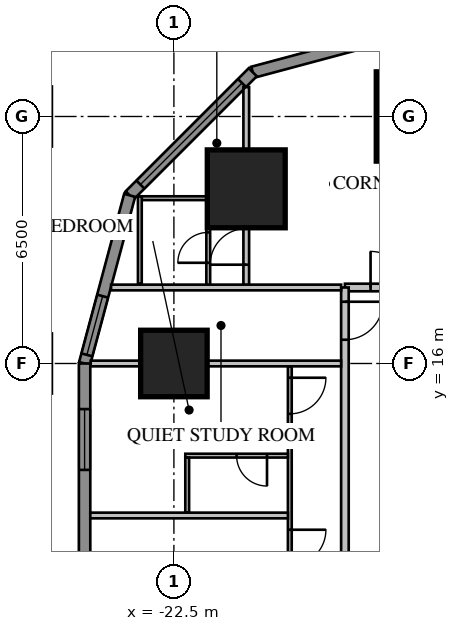
"""IFC4 building model, lengths in metres.
Left out: names, types, materials, properties, quantities, classifications, styles, units other than length and angle.
Written with IfcOpenShell. Run it as: python <this file> out.ifc"""

import sys

from ifc_helpers import new_model, si_unit, direction, frame, frame_2d, origin, origin_2d, place, context, subcontext, project, spatial, rectangle, extrude, element, fill, save


model = new_model("IFC4")
c1 = context("Model", 3, precision=1e-05, world=origin(), true_north=direction((0.0, 1.0)))
c2 = subcontext(c1, "Body", "Model", "MODEL_VIEW")
j1 = project(units=[si_unit("LENGTHUNIT", "METRE"), si_unit("PLANEANGLEUNIT", "RADIAN")], contexts=[c1])
p1 = place(None, origin())
s1 = spatial("IfcSite", under=j1, at=p1, CompositionType="ELEMENT")
p2 = place(p1, origin())
s2 = spatial("IfcBuilding", under=s1, at=p2, CompositionType="ELEMENT")
p3 = place(p2, frame((0.0, 0.0, 23.7)))
s3 = spatial("IfcBuildingStorey", under=s2, at=p3, CompositionType="ELEMENT", Elevation=23.7)
p4 = place(p3, frame((-16.0, 22.5, 0.0), z_axis=(0.0, 0.0, 1.0), x_axis=(1.0, 0.0, 0.0)))
e1 = element("IfcColumn", 1, at=p4, inside=s3, PredefinedType="COLUMN", context=c2, shape_type="SweptSolid", body=[
    extrude(rectangle(XDim=2.35, YDim=2.35, at=origin_2d()), origin(), (0.0, 0.0, 1.0), 3.85),
])
p5 = place(p3, frame((-20.596, 20.596, 0.0), z_axis=(0.0, 0.0, 1.0), x_axis=(1.0, 0.0, 0.0)))
e2 = element("IfcColumn", 2, at=p5, inside=s3, PredefinedType="COLUMN", context=c2, shape_type="SweptSolid", body=[
    extrude(rectangle(XDim=2.05, YDim=2.05, at=origin_2d()), origin(), (0.0, 0.0, 1.0), 3.85),
])
p6 = place(p3, frame((-22.5, 16.0, 0.0), z_axis=(0.0, 0.0, 1.0), x_axis=(1.0, 0.0, 0.0)))
e3 = element("IfcColumn", 3, at=p6, inside=s3, PredefinedType="COLUMN", context=c2, shape_type="SweptSolid", body=[
    extrude(rectangle(XDim=1.75, YDim=1.75, at=origin_2d()), origin(), (0.0, 0.0, 1.0), 3.85),
])
p7 = place(p3, frame((-16.0, 24.85, 0.0), z_axis=(0.0, 0.0, 1.0), x_axis=(-0.965920218567, -0.258839972501, 0.0)))
e4 = element("IfcWall", 4, at=p7, inside=s3, PredefinedType="SOLIDWALL", context=c2, shape_type="SweptSolid", body=[
    extrude(rectangle(XDim=4.581, YDim=0.3, at=frame_2d((2.291, 0.0))), origin(), (0.0, 0.0, 1.0), 3.65),
])
p8 = place(p3, frame((-20.425, 23.664, 0.0), z_axis=(0.0, 0.0, 1.0), x_axis=(-0.707106781187, -0.707106781187, 0.0)))
e5 = element("IfcWall", 5, at=p8, inside=s3, PredefinedType="SOLIDWALL", context=c2, shape_type="SweptSolid", body=[
    extrude(rectangle(XDim=4.581, YDim=0.3, at=frame_2d((2.291, 0.0))), origin(), (0.0, 0.0, 1.0), 3.65),
])
p9 = place(p8, frame((0.4, 0.0, 0.75)))
e6 = element("IfcOpeningElement", 6, at=p9, cuts=e5, PredefinedType="OPENING", context=c2, shape_type="SweptSolid", body=[
    extrude(rectangle(XDim=3.781, YDim=1.8, at=frame_2d((1.891, 0.9))), frame((0.0, 0.17, 0.0), z_axis=(0.0, -1.0, 0.0), x_axis=(1.0, 0.0, 0.0)), (0.0, 0.0, 1.0), 0.34),
])
p10 = place(p3, frame((-23.664, 20.425, 0.0), z_axis=(0.0, 0.0, 1.0), x_axis=(-0.258839972501, -0.965920218567, 0.0)))
e7 = element("IfcWall", 7, at=p10, inside=s3, PredefinedType="SOLIDWALL", context=c2, shape_type="SweptSolid", body=[
    extrude(rectangle(XDim=4.581, YDim=0.3, at=frame_2d((2.291, 0.0))), origin(), (0.0, 0.0, 1.0), 3.65),
])
p11 = place(p10, frame((2.746, 0.0, 0.75)))
e8 = element("IfcOpeningElement", 8, at=p11, cuts=e7, PredefinedType="OPENING", context=c2, shape_type="SweptSolid", body=[
    extrude(rectangle(XDim=1.6, YDim=1.8, at=frame_2d((0.8, 0.9))), frame((0.0, 0.17, 0.0), z_axis=(0.0, -1.0, 0.0), x_axis=(1.0, 0.0, 0.0)), (0.0, 0.0, 1.0), 0.34),
])
p12 = place(p3, frame((-24.85, 16.0, 0.0), z_axis=(0.0, 0.0, 1.0), x_axis=(0.0, -1.0, 0.0)))
e9 = element("IfcWall", 9, at=p12, inside=s3, PredefinedType="SOLIDWALL", context=c2, shape_type="SweptSolid", body=[
    extrude(rectangle(XDim=32.0, YDim=0.3, at=frame_2d((16.0, 0.0))), origin(), (0.0, 0.0, 1.0), 3.65),
])
p13 = place(p12, frame((1.2, 0.0, 0.75)))
e10 = element("IfcOpeningElement", 10, at=p13, cuts=e9, PredefinedType="OPENING", context=c2, shape_type="SweptSolid", body=[
    extrude(rectangle(XDim=1.6, YDim=1.8, at=frame_2d((0.8, 0.9))), frame((0.0, 0.17, 0.0), z_axis=(0.0, -1.0, 0.0), x_axis=(1.0, 0.0, 0.0)), (0.0, 0.0, 1.0), 0.34),
])
p14 = place(p12, frame((5.2, 0.0, 0.75)))
e11 = element("IfcOpeningElement", 11, at=p14, cuts=e9, PredefinedType="OPENING", context=c2, shape_type="SweptSolid", body=[
    extrude(rectangle(XDim=1.6, YDim=1.8, at=frame_2d((0.8, 0.9))), frame((0.0, 0.17, 0.0), z_axis=(0.0, -1.0, 0.0), x_axis=(1.0, 0.0, 0.0)), (0.0, 0.0, 1.0), 0.34),
])
p15 = place(p12, frame((17.2, 0.0, 0.75)))
e12 = element("IfcOpeningElement", 12, at=p15, cuts=e9, PredefinedType="OPENING", context=c2, shape_type="SweptSolid", body=[
    extrude(rectangle(XDim=1.6, YDim=1.8, at=frame_2d((0.8, 0.9))), frame((0.0, 0.17, 0.0), z_axis=(0.0, -1.0, 0.0), x_axis=(1.0, 0.0, 0.0)), (0.0, 0.0, 1.0), 0.34),
])
p16 = place(p12, frame((21.2, 0.0, 0.75)))
e13 = element("IfcOpeningElement", 13, at=p16, cuts=e9, PredefinedType="OPENING", context=c2, shape_type="SweptSolid", body=[
    extrude(rectangle(XDim=1.6, YDim=1.8, at=frame_2d((0.8, 0.9))), frame((0.0, 0.17, 0.0), z_axis=(0.0, -1.0, 0.0), x_axis=(1.0, 0.0, 0.0)), (0.0, 0.0, 1.0), 0.34),
])
p17 = place(p12, frame((25.2, 0.0, 0.75)))
e14 = element("IfcOpeningElement", 14, at=p17, cuts=e9, PredefinedType="OPENING", context=c2, shape_type="SweptSolid", body=[
    extrude(rectangle(XDim=1.6, YDim=1.8, at=frame_2d((0.8, 0.9))), frame((0.0, 0.17, 0.0), z_axis=(0.0, -1.0, 0.0), x_axis=(1.0, 0.0, 0.0)), (0.0, 0.0, 1.0), 0.34),
])
p18 = place(p12, frame((29.2, 0.0, 0.75)))
e15 = element("IfcOpeningElement", 15, at=p18, cuts=e9, PredefinedType="OPENING", context=c2, shape_type="SweptSolid", body=[
    extrude(rectangle(XDim=1.6, YDim=1.8, at=frame_2d((0.8, 0.9))), frame((0.0, 0.17, 0.0), z_axis=(0.0, -1.0, 0.0), x_axis=(1.0, 0.0, 0.0)), (0.0, 0.0, 1.0), 0.34),
])
p19 = place(p12, frame((8.8, 0.0, 0.75)))
e16 = element("IfcOpeningElement", 16, at=p19, cuts=e9, PredefinedType="OPENING", context=c2, shape_type="SweptSolid", body=[
    extrude(rectangle(XDim=2.4, YDim=1.8, at=frame_2d((1.2, 0.9))), frame((0.0, 0.17, 0.0), z_axis=(0.0, -1.0, 0.0), x_axis=(1.0, 0.0, 0.0)), (0.0, 0.0, 1.0), 0.34),
])
p20 = place(p12, frame((13.812, 0.0, 0.0)))
e17 = element("IfcOpeningElement", 17, at=p20, cuts=e9, PredefinedType="OPENING", context=c2, shape_type="SweptSolid", body=[
    extrude(rectangle(XDim=1.0, YDim=2.4, at=frame_2d((0.5, 1.2))), frame((0.0, 0.17, 0.0), z_axis=(0.0, -1.0, 0.0), x_axis=(1.0, 0.0, 0.0)), (0.0, 0.0, 1.0), 0.34),
])
p21 = place(p3, frame((18.0, 18.0, 0.0), z_axis=(0.0, 0.0, 1.0), x_axis=(-1.0, 0.0, 0.0)))
e18 = element("IfcWall", 18, at=p21, inside=s3, PredefinedType="PARTITIONING", context=c2, shape_type="SweptSolid", body=[
    extrude(rectangle(XDim=36.0, YDim=0.2, at=frame_2d((18.0, 0.0))), origin(), (0.0, 0.0, 1.0), 3.65),
])
p22 = place(p21, frame((0.375, 0.0, 0.0)))
e19 = element("IfcOpeningElement", 19, at=p22, cuts=e18, PredefinedType="OPENING", context=c2, shape_type="SweptSolid", body=[
    extrude(rectangle(XDim=1.0, YDim=2.1, at=frame_2d((0.5, 1.05))), frame((0.0, 0.12, 0.0), z_axis=(0.0, -1.0, 0.0), x_axis=(1.0, 0.0, 0.0)), (0.0, 0.0, 1.0), 0.24),
])
p23 = place(p21, frame((3.8, 0.0, 0.0)))
e20 = element("IfcOpeningElement", 20, at=p23, cuts=e18, PredefinedType="OPENING", context=c2, shape_type="SweptSolid", body=[
    extrude(rectangle(XDim=0.95, YDim=2.1, at=frame_2d((0.475, 1.05))), frame((0.0, 0.12, 0.0), z_axis=(0.0, -1.0, 0.0), x_axis=(1.0, 0.0, 0.0)), (0.0, 0.0, 1.0), 0.24),
])
p24 = place(p21, frame((7.8, 0.0, 0.0)))
e21 = element("IfcOpeningElement", 21, at=p24, cuts=e18, PredefinedType="OPENING", context=c2, shape_type="SweptSolid", body=[
    extrude(rectangle(XDim=0.95, YDim=2.1, at=frame_2d((0.475, 1.05))), frame((0.0, 0.12, 0.0), z_axis=(0.0, -1.0, 0.0), x_axis=(1.0, 0.0, 0.0)), (0.0, 0.0, 1.0), 0.24),
])
p25 = place(p21, frame((19.8, 0.0, 0.0)))
e22 = element("IfcOpeningElement", 22, at=p25, cuts=e18, PredefinedType="OPENING", context=c2, shape_type="SweptSolid", body=[
    extrude(rectangle(XDim=0.95, YDim=2.1, at=frame_2d((0.475, 1.05))), frame((0.0, 0.12, 0.0), z_axis=(0.0, -1.0, 0.0), x_axis=(1.0, 0.0, 0.0)), (0.0, 0.0, 1.0), 0.24),
])
p26 = place(p21, frame((23.8, 0.0, 0.0)))
e23 = element("IfcOpeningElement", 23, at=p26, cuts=e18, PredefinedType="OPENING", context=c2, shape_type="SweptSolid", body=[
    extrude(rectangle(XDim=0.95, YDim=2.1, at=frame_2d((0.475, 1.05))), frame((0.0, 0.12, 0.0), z_axis=(0.0, -1.0, 0.0), x_axis=(1.0, 0.0, 0.0)), (0.0, 0.0, 1.0), 0.24),
])
p27 = place(p21, frame((27.8, 0.0, 0.0)))
e24 = element("IfcOpeningElement", 24, at=p27, cuts=e18, PredefinedType="OPENING", context=c2, shape_type="SweptSolid", body=[
    extrude(rectangle(XDim=0.95, YDim=2.1, at=frame_2d((0.475, 1.05))), frame((0.0, 0.12, 0.0), z_axis=(0.0, -1.0, 0.0), x_axis=(1.0, 0.0, 0.0)), (0.0, 0.0, 1.0), 0.24),
])
p28 = place(p21, frame((31.8, 0.0, 0.0)))
e25 = element("IfcOpeningElement", 25, at=p28, cuts=e18, PredefinedType="OPENING", context=c2, shape_type="SweptSolid", body=[
    extrude(rectangle(XDim=0.95, YDim=2.1, at=frame_2d((0.475, 1.05))), frame((0.0, 0.12, 0.0), z_axis=(0.0, -1.0, 0.0), x_axis=(1.0, 0.0, 0.0)), (0.0, 0.0, 1.0), 0.24),
])
p29 = place(p21, frame((34.375, 0.0, 0.0)))
e26 = element("IfcOpeningElement", 26, at=p29, cuts=e18, PredefinedType="OPENING", context=c2, shape_type="SweptSolid", body=[
    extrude(rectangle(XDim=0.95, YDim=2.1, at=frame_2d((0.475, 1.05))), frame((0.0, 0.12, 0.0), z_axis=(0.0, -1.0, 0.0), x_axis=(1.0, 0.0, 0.0)), (0.0, 0.0, 1.0), 0.24),
])
p30 = place(p21, frame((11.2, 0.0, 0.0)))
e27 = element("IfcOpeningElement", 27, at=p30, cuts=e18, PredefinedType="OPENING", context=c2, shape_type="SweptSolid", body=[
    extrude(rectangle(XDim=1.0, YDim=2.1, at=frame_2d((0.5, 1.05))), frame((0.0, 0.12, 0.0), z_axis=(0.0, -1.0, 0.0), x_axis=(1.0, 0.0, 0.0)), (0.0, 0.0, 1.0), 0.24),
])
p31 = place(p3, frame((-21.596, 18.065, 0.0), z_axis=(0.0, 0.0, 1.0), x_axis=(0.0, 1.0, 0.0)))
e28 = element("IfcWall", 28, at=p31, inside=s3, PredefinedType="PARTITIONING", context=c2, shape_type="SweptSolid", body=[
    extrude(rectangle(XDim=2.335, YDim=0.1, at=frame_2d((1.167, 0.0))), origin(), (0.0, 0.0, 1.0), 3.65),
])
p32 = place(p31, frame((0.585, 0.0, 0.0)))
e29 = element("IfcOpeningElement", 29, at=p32, cuts=e28, PredefinedType="OPENING", context=c2, shape_type="SweptSolid", body=[
    extrude(rectangle(XDim=0.8, YDim=2.1, at=frame_2d((0.4, 1.05))), frame((0.0, 0.07, 0.0), z_axis=(0.0, -1.0, 0.0), x_axis=(1.0, 0.0, 0.0)), (0.0, 0.0, 1.0), 0.14),
])
p33 = place(p3, frame((-21.646, 20.35, 0.0), z_axis=(0.0, 0.0, 1.0), x_axis=(-1.0, 0.0, 0.0)))
e30 = element("IfcWall", 30, at=p33, inside=s3, PredefinedType="PARTITIONING", context=c2, shape_type="SweptSolid", body=[
    extrude(rectangle(XDim=1.7, YDim=0.1, at=frame_2d((0.85, 0.0))), origin(), (0.0, 0.0, 1.0), 3.65),
])
p34 = place(p3, frame((-23.396, 18.1, 0.0), z_axis=(0.0, 0.0, 1.0), x_axis=(0.0, 1.0, 0.0)))
e31 = element("IfcWall", 31, at=p34, inside=s3, PredefinedType="PARTITIONING", context=c2, shape_type="SweptSolid", body=[
    extrude(rectangle(XDim=2.3, YDim=0.1, at=frame_2d((1.15, 0.0))), origin(), (0.0, 0.0, 1.0), 3.65),
])
p35 = place(p3, frame((-20.596, 18.065, 0.0), z_axis=(0.0, 0.0, 1.0), x_axis=(0.0, 1.0, 0.0)))
e32 = element("IfcWall", 32, at=p35, inside=s3, PredefinedType="PARTITIONING", context=c2, shape_type="SweptSolid", body=[
    extrude(rectangle(XDim=5.209, YDim=0.15, at=frame_2d((2.604, 0.0))), origin(), (0.0, 0.0, 1.0), 3.65),
])
p36 = place(p35, frame((0.535, 0.0, 0.0)))
e33 = element("IfcOpeningElement", 33, at=p36, cuts=e32, PredefinedType="OPENING", context=c2, shape_type="SweptSolid", body=[
    extrude(rectangle(XDim=0.95, YDim=2.1, at=frame_2d((0.475, 1.05))), frame((0.0, 0.095, 0.0), z_axis=(0.0, -1.0, 0.0), x_axis=(1.0, 0.0, 0.0)), (0.0, 0.0, 1.0), 0.19),
])
p37 = place(p3, frame((-18.0, 18.0, 0.0), z_axis=(0.0, 0.0, 1.0), x_axis=(0.0, -1.0, 0.0)))
e34 = element("IfcWall", 34, at=p37, inside=s3, PredefinedType="PARTITIONING", context=c2, shape_type="SweptSolid", body=[
    extrude(rectangle(XDim=36.0, YDim=0.2, at=frame_2d((18.0, 0.0))), origin(), (0.0, 0.0, 1.0), 3.65),
])
p38 = place(p37, frame((10.4, 0.0, 0.0)))
e35 = element("IfcOpeningElement", 35, at=p38, cuts=e34, PredefinedType="OPENING", context=c2, shape_type="SweptSolid", body=[
    extrude(rectangle(XDim=1.0, YDim=2.1, at=frame_2d((0.5, 1.05))), frame((0.0, 0.12, 0.0), z_axis=(0.0, -1.0, 0.0), x_axis=(1.0, 0.0, 0.0)), (0.0, 0.0, 1.0), 0.24),
])
p39 = place(p37, frame((14.4, 0.0, 0.0)))
e36 = element("IfcOpeningElement", 36, at=p39, cuts=e34, PredefinedType="OPENING", context=c2, shape_type="SweptSolid", body=[
    extrude(rectangle(XDim=1.0, YDim=2.1, at=frame_2d((0.5, 1.05))), frame((0.0, 0.12, 0.0), z_axis=(0.0, -1.0, 0.0), x_axis=(1.0, 0.0, 0.0)), (0.0, 0.0, 1.0), 0.24),
])
p40 = place(p37, frame((0.375, 0.0, 0.0)))
e37 = element("IfcOpeningElement", 37, at=p40, cuts=e34, PredefinedType="OPENING", context=c2, shape_type="SweptSolid", body=[
    extrude(rectangle(XDim=1.0, YDim=2.1, at=frame_2d((0.5, 1.05))), frame((0.0, 0.12, 0.0), z_axis=(0.0, -1.0, 0.0), x_axis=(1.0, 0.0, 0.0)), (0.0, 0.0, 1.0), 0.24),
])
p41 = place(p37, frame((34.375, 0.0, 0.0)))
e38 = element("IfcOpeningElement", 38, at=p41, cuts=e34, PredefinedType="OPENING", context=c2, shape_type="SweptSolid", body=[
    extrude(rectangle(XDim=0.95, YDim=2.1, at=frame_2d((0.475, 1.05))), frame((0.0, 0.12, 0.0), z_axis=(0.0, -1.0, 0.0), x_axis=(1.0, 0.0, 0.0)), (0.0, 0.0, 1.0), 0.24),
])
p42 = place(p3, frame((-19.45, 15.925, 0.0), z_axis=(0.0, 0.0, 1.0), x_axis=(0.0, -1.0, 0.0)))
e39 = element("IfcWall", 39, at=p42, inside=s3, PredefinedType="PARTITIONING", context=c2, shape_type="SweptSolid", body=[
    extrude(rectangle(XDim=11.85, YDim=0.1, at=frame_2d((5.925, 0.0))), origin(), (0.0, 0.0, 1.0), 3.65),
])
p43 = place(p42, frame((10.125, 0.0, 0.0)))
e40 = element("IfcOpeningElement", 40, at=p43, cuts=e39, PredefinedType="OPENING", context=c2, shape_type="SweptSolid", body=[
    extrude(rectangle(XDim=1.0, YDim=2.1, at=frame_2d((0.5, 1.05))), frame((0.0, 0.07, 0.0), z_axis=(0.0, -1.0, 0.0), x_axis=(1.0, 0.0, 0.0)), (0.0, 0.0, 1.0), 0.14),
])
p44 = place(p42, frame((8.3, 0.0, 0.0)))
e41 = element("IfcOpeningElement", 41, at=p44, cuts=e39, PredefinedType="OPENING", context=c2, shape_type="SweptSolid", body=[
    extrude(rectangle(XDim=0.8, YDim=2.1, at=frame_2d((0.4, 1.05))), frame((0.0, 0.07, 0.0), z_axis=(0.0, -1.0, 0.0), x_axis=(1.0, 0.0, 0.0)), (0.0, 0.0, 1.0), 0.14),
])
p45 = place(p42, frame((0.3, 0.0, 0.0)))
e42 = element("IfcOpeningElement", 42, at=p45, cuts=e39, PredefinedType="OPENING", context=c2, shape_type="SweptSolid", body=[
    extrude(rectangle(XDim=0.95, YDim=2.1, at=frame_2d((0.475, 1.05))), frame((0.0, 0.07, 0.0), z_axis=(0.0, -1.0, 0.0), x_axis=(1.0, 0.0, 0.0)), (0.0, 0.0, 1.0), 0.14),
])
p46 = place(p42, frame((4.3, 0.0, 0.0)))
e43 = element("IfcOpeningElement", 43, at=p46, cuts=e39, PredefinedType="OPENING", context=c2, shape_type="SweptSolid", body=[
    extrude(rectangle(XDim=0.95, YDim=2.1, at=frame_2d((0.475, 1.05))), frame((0.0, 0.07, 0.0), z_axis=(0.0, -1.0, 0.0), x_axis=(1.0, 0.0, 0.0)), (0.0, 0.0, 1.0), 0.14),
])
p47 = place(p3, frame((-18.1, 18.0, 0.0), z_axis=(0.0, 0.0, 1.0), x_axis=(-1.0, 0.0, 0.0)))
e44 = element("IfcWall", 44, at=p47, inside=s3, PredefinedType="PARTITIONING", context=c2, shape_type="SweptSolid", body=[
    extrude(rectangle(XDim=6.053, YDim=0.15, at=frame_2d((3.027, 0.0))), origin(), (0.0, 0.0, 1.0), 3.65),
])
p48 = place(p3, frame((-18.1, 16.0, 0.0), z_axis=(0.0, 0.0, 1.0), x_axis=(-1.0, 0.0, 0.0)))
e45 = element("IfcWall", 45, at=p48, inside=s3, PredefinedType="PARTITIONING", context=c2, shape_type="SweptSolid", body=[
    extrude(rectangle(XDim=6.589, YDim=0.15, at=frame_2d((3.295, 0.0))), origin(), (0.0, 0.0, 1.0), 3.65),
])
p49 = place(p3, frame((-19.5, 12.0, 0.0), z_axis=(0.0, 0.0, 1.0), x_axis=(-1.0, 0.0, 0.0)))
e46 = element("IfcWall", 46, at=p49, inside=s3, PredefinedType="PARTITIONING", context=c2, shape_type="SweptSolid", body=[
    extrude(rectangle(XDim=5.2, YDim=0.15, at=frame_2d((2.6, 0.0))), origin(), (0.0, 0.0, 1.0), 3.65),
])
p50 = place(p3, frame((-19.5, 13.575, 0.0), z_axis=(0.0, 0.0, 1.0), x_axis=(-1.0, 0.0, 0.0)))
e47 = element("IfcWall", 47, at=p50, inside=s3, PredefinedType="PARTITIONING", context=c2, shape_type="SweptSolid", body=[
    extrude(rectangle(XDim=2.7, YDim=0.1, at=frame_2d((1.35, 0.0))), origin(), (0.0, 0.0, 1.0), 3.65),
])
p51 = place(p50, frame((0.55, 0.0, 0.0)))
e48 = element("IfcOpeningElement", 48, at=p51, cuts=e47, PredefinedType="OPENING", context=c2, shape_type="SweptSolid", body=[
    extrude(rectangle(XDim=0.8, YDim=2.1, at=frame_2d((0.4, 1.05))), frame((0.0, 0.07, 0.0), z_axis=(0.0, -1.0, 0.0), x_axis=(1.0, 0.0, 0.0)), (0.0, 0.0, 1.0), 0.14),
])
p52 = place(p3, frame((-22.15, 13.525, 0.0), z_axis=(0.0, 0.0, 1.0), x_axis=(0.0, -1.0, 0.0)))
e49 = element("IfcWall", 49, at=p52, inside=s3, PredefinedType="PARTITIONING", context=c2, shape_type="SweptSolid", body=[
    extrude(rectangle(XDim=1.45, YDim=0.1, at=frame_2d((0.725, 0.0))), origin(), (0.0, 0.0, 1.0), 3.65),
])
p53 = place(p9, origin())
e50 = element("IfcWindow", 50, at=p53, inside=s3, PartitioningType="SINGLE_PANEL", PredefinedType="WINDOW", context=c2, shape_type="SweptSolid", body=[
    extrude(rectangle(XDim=3.781, YDim=1.8, at=frame_2d((1.891, 0.9))), frame((0.0, 0.03, 0.0), z_axis=(0.0, -1.0, 0.0), x_axis=(1.0, 0.0, 0.0)), (0.0, 0.0, 1.0), 0.06),
])
fill(e6, e50)
p54 = place(p11, origin())
e51 = element("IfcWindow", 51, at=p54, inside=s3, PartitioningType="SINGLE_PANEL", PredefinedType="WINDOW", context=c2, shape_type="SweptSolid", body=[
    extrude(rectangle(XDim=1.6, YDim=1.8, at=frame_2d((0.8, 0.9))), frame((0.0, 0.03, 0.0), z_axis=(0.0, -1.0, 0.0), x_axis=(1.0, 0.0, 0.0)), (0.0, 0.0, 1.0), 0.06),
])
fill(e8, e51)
p55 = place(p13, origin())
e52 = element("IfcWindow", 52, at=p55, inside=s3, PartitioningType="SINGLE_PANEL", PredefinedType="WINDOW", context=c2, shape_type="SweptSolid", body=[
    extrude(rectangle(XDim=1.6, YDim=1.8, at=frame_2d((0.8, 0.9))), frame((0.0, 0.03, 0.0), z_axis=(0.0, -1.0, 0.0), x_axis=(1.0, 0.0, 0.0)), (0.0, 0.0, 1.0), 0.06),
])
fill(e10, e52)
p56 = place(p29, origin())
e53 = element("IfcDoor", 53, at=p56, inside=s3, OperationType="SINGLE_SWING_RIGHT", PredefinedType="DOOR", context=c2, shape_type="SweptSolid", body=[
    extrude(rectangle(XDim=0.95, YDim=2.1, at=frame_2d((0.475, 1.05))), frame((0.0, 0.025, 0.0), z_axis=(0.0, -1.0, 0.0), x_axis=(1.0, 0.0, 0.0)), (0.0, 0.0, 1.0), 0.05),
])
fill(e26, e53)
p57 = place(p32, origin())
e54 = element("IfcDoor", 54, at=p57, inside=s3, OperationType="SINGLE_SWING_LEFT", PredefinedType="DOOR", context=c2, shape_type="SweptSolid", body=[
    extrude(rectangle(XDim=0.8, YDim=2.1, at=frame_2d((0.4, 1.05))), frame((0.0, 0.025, 0.0), z_axis=(0.0, -1.0, 0.0), x_axis=(1.0, 0.0, 0.0)), (0.0, 0.0, 1.0), 0.05),
])
fill(e29, e54)
p58 = place(p36, origin())
e55 = element("IfcDoor", 55, at=p58, inside=s3, OperationType="SINGLE_SWING_LEFT", PredefinedType="DOOR", context=c2, shape_type="SweptSolid", body=[
    extrude(rectangle(XDim=0.95, YDim=2.1, at=frame_2d((0.475, 1.05))), frame((0.0, 0.025, 0.0), z_axis=(0.0, -1.0, 0.0), x_axis=(1.0, 0.0, 0.0)), (0.0, 0.0, 1.0), 0.05),
])
fill(e33, e55)
p59 = place(p40, origin())
e56 = element("IfcDoor", 56, at=p59, inside=s3, OperationType="SINGLE_SWING_LEFT", PredefinedType="DOOR", context=c2, shape_type="SweptSolid", body=[
    extrude(rectangle(XDim=1.0, YDim=2.1, at=frame_2d((0.5, 1.05))), frame((0.0, 0.025, 0.0), z_axis=(0.0, -1.0, 0.0), x_axis=(1.0, 0.0, 0.0)), (0.0, 0.0, 1.0), 0.05),
])
fill(e37, e56)
p60 = place(p45, origin())
e57 = element("IfcDoor", 57, at=p60, inside=s3, OperationType="SINGLE_SWING_LEFT", PredefinedType="DOOR", context=c2, shape_type="SweptSolid", body=[
    extrude(rectangle(XDim=0.95, YDim=2.1, at=frame_2d((0.475, 1.05))), frame((0.0, 0.025, 0.0), z_axis=(0.0, -1.0, 0.0), x_axis=(1.0, 0.0, 0.0)), (0.0, 0.0, 1.0), 0.05),
])
fill(e42, e57)
p61 = place(p51, origin())
e58 = element("IfcDoor", 58, at=p61, inside=s3, OperationType="SINGLE_SWING_LEFT", PredefinedType="DOOR", context=c2, shape_type="SweptSolid", body=[
    extrude(rectangle(XDim=0.8, YDim=2.1, at=frame_2d((0.4, 1.05))), frame((0.0, 0.025, 0.0), z_axis=(0.0, -1.0, 0.0), x_axis=(1.0, 0.0, 0.0)), (0.0, 0.0, 1.0), 0.05),
])
fill(e48, e58)
p62 = place(p46, origin())
e59 = element("IfcDoor", 59, at=p62, inside=s3, OperationType="SINGLE_SWING_LEFT", PredefinedType="DOOR", context=c2, shape_type="SweptSolid", body=[
    extrude(rectangle(XDim=0.95, YDim=2.1, at=frame_2d((0.475, 1.05))), frame((0.0, 0.025, 0.0), z_axis=(0.0, -1.0, 0.0), x_axis=(1.0, 0.0, 0.0)), (0.0, 0.0, 1.0), 0.05),
])
fill(e43, e59)
save(model, sys.argv[1])
